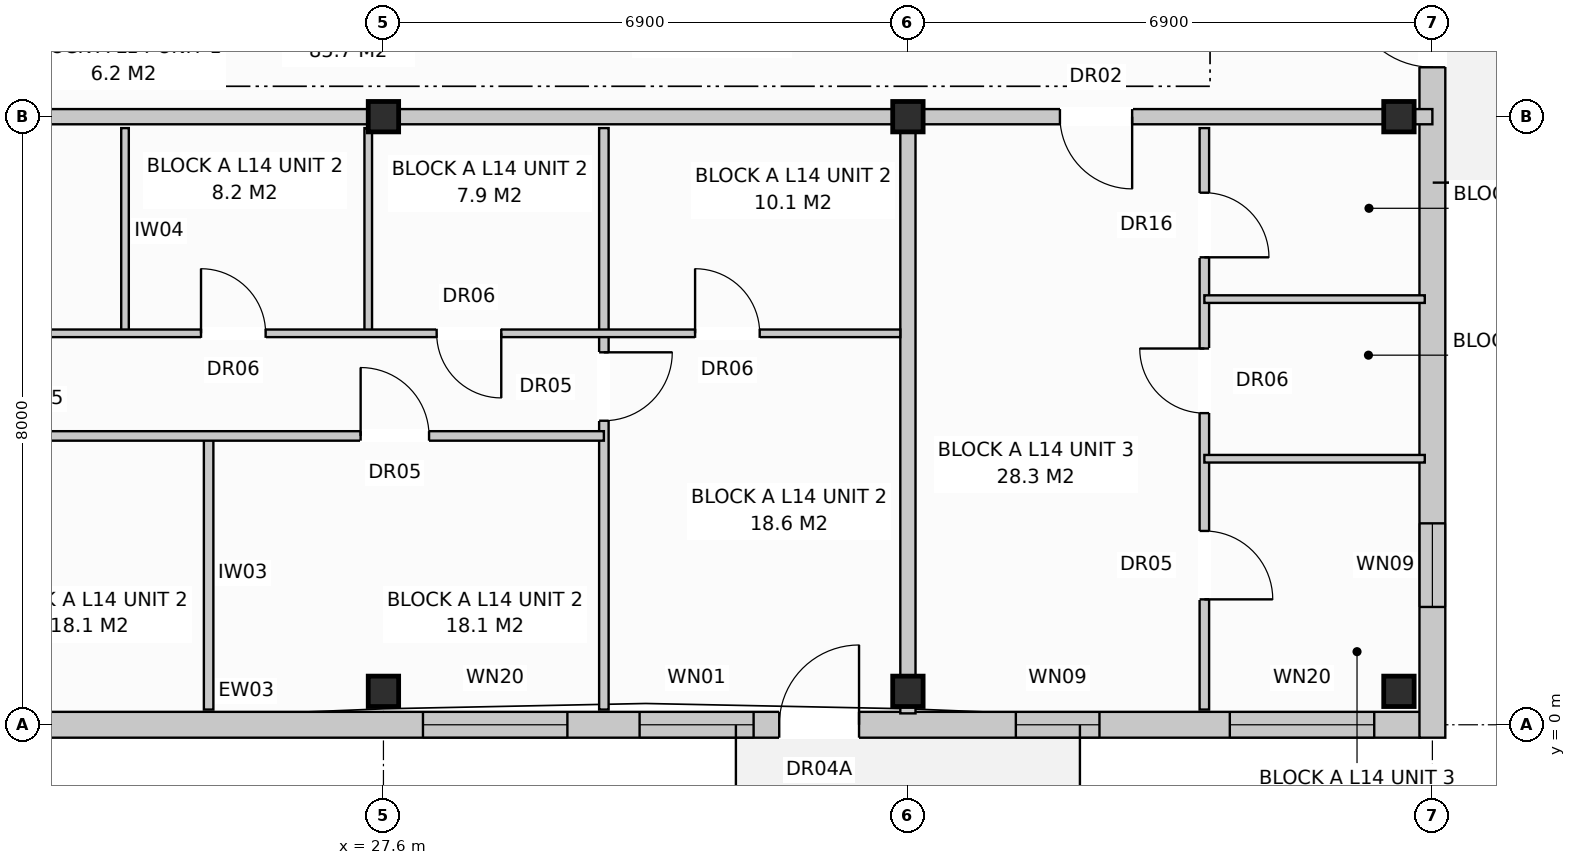
"""IFC4 building model, lengths in metres.
Left out: names, types, materials, properties, quantities, classifications, styles, units other than length and angle.
Written with IfcOpenShell. Run it as: python <this file> out.ifc"""

import sys

from ifc_helpers import new_model, si_unit, direction, frame, frame_2d, origin, origin_with_axes, origin_2d, place, context, subcontext, project, spatial, rectangle, extrude, element, fill, save


model = new_model("IFC4")
c1 = context("Model", 3, precision=1e-05, world=origin(), true_north=direction((0.0, 1.0)))
c2 = subcontext(c1, "Body", "Model", "MODEL_VIEW")
j1 = project(units=[si_unit("LENGTHUNIT", "METRE"), si_unit("PLANEANGLEUNIT", "RADIAN")], contexts=[c1])
p1 = place(None, origin())
s1 = spatial("IfcSite", under=j1, at=p1, CompositionType="ELEMENT")
p2 = place(p1, origin())
s2 = spatial("IfcBuilding", under=s1, at=p2, CompositionType="ELEMENT")
p3 = place(p2, frame((0.0, 0.0, 46.4)))
s3 = spatial("IfcBuildingStorey", under=s2, at=p3, CompositionType="ELEMENT", Elevation=46.4)
for number, where, z_axis, x_axis in (
    (1, (27.6, 0.44, 0.0), (0.0, 0.0, 1.0), (1.0, 0.0, 0.0)),
    (2, (27.6, 8.0, 0.0), (0.0, 0.0, 1.0), (1.0, 0.0, 0.0)),
    (3, (34.5, 0.44, 0.0), (0.0, 0.0, 1.0), (1.0, 0.0, 0.0)),
    (4, (34.5, 8.0, 0.0), (0.0, 0.0, 1.0), (1.0, 0.0, 0.0)),
    (5, (40.96, 0.44, 0.0), (0.0, 0.0, 1.0), (1.0, 0.0, 0.0)),
    (6, (40.96, 8.0, 0.0), (0.0, 0.0, 1.0), (1.0, 0.0, 0.0)),
):
    element("IfcColumn", number, at=place(p3, frame(where, z_axis=z_axis, x_axis=x_axis)), inside=s3, PredefinedType="COLUMN", context=c2, shape_type="SweptSolid", body=[
        extrude(rectangle(XDim=0.4, YDim=0.4, at=origin_2d()), origin(), (0.0, 0.0, 1.0), 3.2),
    ])
p4 = place(p3, frame((0.16, 0.0, 0.0), z_axis=(0.0, 0.0, 1.0), x_axis=(1.0, 0.0, 0.0)))
e7 = element("IfcWall", 7, at=p4, inside=s3, PredefinedType="STANDARD", context=c2, shape_type="SweptSolid", body=[
    extrude(rectangle(XDim=41.08, YDim=0.34, at=frame_2d((20.54, 0.0))), origin(), (0.0, 0.0, 1.0), 2.91),
])
p5 = place(p4, frame((7.36, 0.0, 0.0)))
e8 = element("IfcOpeningElement", 8, at=p5, cuts=e7, PredefinedType="OPENING", context=c2, shape_type="SweptSolid", body=[
    extrude(rectangle(XDim=1.05, YDim=2.12, at=frame_2d((0.525, 1.06))), frame((0.0, 0.182, 0.0), z_axis=(0.0, -1.0, 0.0), x_axis=(1.0, 0.0, 0.0)), (0.0, 0.0, 1.0), 0.364),
])
p6 = place(p4, frame((18.647, 0.0, 0.0)))
e9 = element("IfcOpeningElement", 9, at=p6, cuts=e7, PredefinedType="OPENING", context=c2, shape_type="SweptSolid", body=[
    extrude(rectangle(XDim=1.05, YDim=2.12, at=frame_2d((0.525, 1.06))), frame((0.0, 0.182, 0.0), z_axis=(0.0, -1.0, 0.0), x_axis=(1.0, 0.0, 0.0)), (0.0, 0.0, 1.0), 0.364),
])
p7 = place(p4, frame((32.647, 0.0, 0.0)))
e10 = element("IfcOpeningElement", 10, at=p7, cuts=e7, PredefinedType="OPENING", context=c2, shape_type="SweptSolid", body=[
    extrude(rectangle(XDim=1.05, YDim=2.12, at=frame_2d((0.525, 1.06))), frame((0.0, 0.182, 0.0), z_axis=(0.0, -1.0, 0.0), x_axis=(1.0, 0.0, 0.0)), (0.0, 0.0, 1.0), 0.364),
])
p8 = place(p4, frame((1.61, 0.0, 0.8)))
e11 = element("IfcOpeningElement", 11, at=p8, cuts=e7, PredefinedType="OPENING", context=c2, shape_type="SweptSolid", body=[
    extrude(rectangle(XDim=1.8, YDim=1.7, at=frame_2d((0.9, 0.85))), frame((0.0, 0.182, 0.0), z_axis=(0.0, -1.0, 0.0), x_axis=(1.0, 0.0, 0.0)), (0.0, 0.0, 1.0), 0.364),
])
p9 = place(p4, frame((10.46, 0.0, 0.8)))
e12 = element("IfcOpeningElement", 12, at=p9, cuts=e7, PredefinedType="OPENING", context=c2, shape_type="SweptSolid", body=[
    extrude(rectangle(XDim=1.9, YDim=1.85, at=frame_2d((0.95, 0.925))), frame((0.0, 0.182, 0.0), z_axis=(0.0, -1.0, 0.0), x_axis=(1.0, 0.0, 0.0)), (0.0, 0.0, 1.0), 0.364),
])
p10 = place(p4, frame((15.835, 0.0, 0.8)))
e13 = element("IfcOpeningElement", 13, at=p10, cuts=e7, PredefinedType="OPENING", context=c2, shape_type="SweptSolid", body=[
    extrude(rectangle(XDim=1.95, YDim=1.65, at=frame_2d((0.975, 0.825))), frame((0.0, 0.182, 0.0), z_axis=(0.0, -1.0, 0.0), x_axis=(1.0, 0.0, 0.0)), (0.0, 0.0, 1.0), 0.364),
])
p11 = place(p4, frame((21.96, 0.0, 0.72)))
e14 = element("IfcOpeningElement", 14, at=p11, cuts=e7, PredefinedType="OPENING", context=c2, shape_type="SweptSolid", body=[
    extrude(rectangle(XDim=1.1, YDim=1.5, at=frame_2d((0.55, 0.75))), frame((0.0, 0.182, 0.0), z_axis=(0.0, -1.0, 0.0), x_axis=(1.0, 0.0, 0.0)), (0.0, 0.0, 1.0), 0.364),
])
p12 = place(p4, frame((27.96, 0.0, 0.8)))
e15 = element("IfcOpeningElement", 15, at=p12, cuts=e7, PredefinedType="OPENING", context=c2, shape_type="SweptSolid", body=[
    extrude(rectangle(XDim=1.9, YDim=1.85, at=frame_2d((0.95, 0.925))), frame((0.0, 0.182, 0.0), z_axis=(0.0, -1.0, 0.0), x_axis=(1.0, 0.0, 0.0)), (0.0, 0.0, 1.0), 0.364),
])
p13 = place(p4, frame((30.81, 0.0, 0.85)))
e16 = element("IfcOpeningElement", 16, at=p13, cuts=e7, PredefinedType="OPENING", context=c2, shape_type="SweptSolid", body=[
    extrude(rectangle(XDim=1.5, YDim=1.65, at=frame_2d((0.75, 0.825))), frame((0.0, 0.182, 0.0), z_axis=(0.0, -1.0, 0.0), x_axis=(1.0, 0.0, 0.0)), (0.0, 0.0, 1.0), 0.364),
])
p14 = place(p4, frame((35.76, 0.0, 0.72)))
e17 = element("IfcOpeningElement", 17, at=p14, cuts=e7, PredefinedType="OPENING", context=c2, shape_type="SweptSolid", body=[
    extrude(rectangle(XDim=1.1, YDim=1.5, at=frame_2d((0.55, 0.75))), frame((0.0, 0.182, 0.0), z_axis=(0.0, -1.0, 0.0), x_axis=(1.0, 0.0, 0.0)), (0.0, 0.0, 1.0), 0.364),
])
p15 = place(p4, frame((38.575, 0.0, 0.8)))
e18 = element("IfcOpeningElement", 18, at=p15, cuts=e7, PredefinedType="OPENING", context=c2, shape_type="SweptSolid", body=[
    extrude(rectangle(XDim=1.9, YDim=1.85, at=frame_2d((0.95, 0.925))), frame((0.0, 0.182, 0.0), z_axis=(0.0, -1.0, 0.0), x_axis=(1.0, 0.0, 0.0)), (0.0, 0.0, 1.0), 0.364),
])
p16 = place(p3, frame((41.4, -0.17, 0.0), z_axis=(0.0, 0.0, 1.0), x_axis=(0.0, 1.0, 0.0)))
e19 = element("IfcWall", 19, at=p16, inside=s3, PredefinedType="STANDARD", context=c2, shape_type="SweptSolid", body=[
    extrude(rectangle(XDim=18.74, YDim=0.34, at=frame_2d((9.37, 0.0))), origin(), (0.0, 0.0, 1.0), 2.91),
])
p17 = place(p16, frame((8.82, 0.0, 0.0)))
e20 = element("IfcOpeningElement", 20, at=p17, cuts=e19, PredefinedType="OPENING", context=c2, shape_type="SweptSolid", body=[
    extrude(rectangle(XDim=1.1, YDim=2.1, at=frame_2d((0.55, 1.05))), frame((0.0, 0.182, 0.0), z_axis=(0.0, -1.0, 0.0), x_axis=(1.0, 0.0, 0.0)), (0.0, 0.0, 1.0), 0.364),
])
p18 = place(p16, frame((1.72, 0.0, 0.72)))
e21 = element("IfcOpeningElement", 21, at=p18, cuts=e19, PredefinedType="OPENING", context=c2, shape_type="SweptSolid", body=[
    extrude(rectangle(XDim=1.1, YDim=1.5, at=frame_2d((0.55, 0.75))), frame((0.0, 0.182, 0.0), z_axis=(0.0, -1.0, 0.0), x_axis=(1.0, 0.0, 0.0)), (0.0, 0.0, 1.0), 0.364),
])
p19 = place(p16, frame((15.92, 0.0, 0.72)))
e22 = element("IfcOpeningElement", 22, at=p19, cuts=e19, PredefinedType="OPENING", context=c2, shape_type="SweptSolid", body=[
    extrude(rectangle(XDim=1.1, YDim=1.5, at=frame_2d((0.55, 0.75))), frame((0.0, 0.182, 0.0), z_axis=(0.0, -1.0, 0.0), x_axis=(1.0, 0.0, 0.0)), (0.0, 0.0, 1.0), 0.364),
])
p20 = place(p3, frame((34.5, 7.85, 0.0), z_axis=(0.0, 0.0, 1.0), x_axis=(0.0, -1.0, 0.0)))
e23 = element("IfcWall", 23, at=p20, inside=s3, PredefinedType="PARTITIONING", context=c2, shape_type="SweptSolid", body=[
    extrude(rectangle(XDim=7.7, YDim=0.2, at=frame_2d((3.85, 0.0))), origin(), (0.0, 0.0, 1.0), 2.35),
])
p21 = place(p3, frame((13.8, 8.0, 0.0), z_axis=(0.0, 0.0, 1.0), x_axis=(1.0, 0.0, 0.0)))
e24 = element("IfcWall", 24, at=p21, inside=s3, PredefinedType="PARTITIONING", context=c2, shape_type="SweptSolid", body=[
    extrude(rectangle(XDim=20.7, YDim=0.2, at=frame_2d((10.35, 0.0))), origin(), (0.0, 0.0, 1.0), 2.35),
])
p22 = place(p21, frame((2.4, 0.0, 0.0)))
e25 = element("IfcOpeningElement", 25, at=p22, cuts=e24, PredefinedType="OPENING", context=c2, shape_type="SweptSolid", body=[
    extrude(rectangle(XDim=0.95, YDim=2.15, at=frame_2d((0.475, 1.075))), frame((0.0, 0.112, 0.0), z_axis=(0.0, -1.0, 0.0), x_axis=(1.0, 0.0, 0.0)), (0.0, 0.0, 1.0), 0.224),
])
for number, where, z_axis, x_axis in (
    (26, (24.2, 7.85, 0.0), (0.0, 0.0, 1.0), (0.0, -1.0, 0.0)),
    (27, (27.4, 7.85, 0.0), (0.0, 0.0, 1.0), (0.0, -1.0, 0.0)),
):
    element("IfcWall", number, at=place(p3, frame(where, z_axis=z_axis, x_axis=x_axis)), inside=s3, PredefinedType="PARTITIONING", context=c2, shape_type="SweptSolid", body=[
        extrude(rectangle(XDim=2.7, YDim=0.1, at=frame_2d((1.35, 0.0))), origin(), (0.0, 0.0, 1.0), 2.91),
    ])
p23 = place(p3, frame((25.3, 3.8, 0.0), z_axis=(0.0, 0.0, 1.0), x_axis=(0.0, -1.0, 0.0)))
e28 = element("IfcWall", 28, at=p23, inside=s3, PredefinedType="PARTITIONING", context=c2, shape_type="SweptSolid", body=[
    extrude(rectangle(XDim=3.6, YDim=0.125, at=frame_2d((1.8, 0.0))), origin(), (0.0, 0.0, 1.0), 2.91),
])
p24 = place(p3, frame((30.5, 7.85, 0.0), z_axis=(0.0, 0.0, 1.0), x_axis=(0.0, -1.0, 0.0)))
e29 = element("IfcWall", 29, at=p24, inside=s3, PredefinedType="PARTITIONING", context=c2, shape_type="SweptSolid", body=[
    extrude(rectangle(XDim=7.65, YDim=0.125, at=frame_2d((3.825, 0.0))), origin(), (0.0, 0.0, 1.0), 2.91),
])
p25 = place(p24, frame((2.95, 0.0, 0.0)))
e30 = element("IfcOpeningElement", 30, at=p25, cuts=e29, PredefinedType="OPENING", context=c2, shape_type="SweptSolid", body=[
    extrude(rectangle(XDim=0.9, YDim=2.1, at=frame_2d((0.45, 1.05))), frame((0.0, 0.074, 0.0), z_axis=(0.0, -1.0, 0.0), x_axis=(1.0, 0.0, 0.0)), (0.0, 0.0, 1.0), 0.149),
])
p26 = place(p3, frame((20.1, 5.15, 0.0), z_axis=(0.0, 0.0, 1.0), x_axis=(1.0, 0.0, 0.0)))
e31 = element("IfcWall", 31, at=p26, inside=s3, PredefinedType="PARTITIONING", context=c2, shape_type="SweptSolid", body=[
    extrude(rectangle(XDim=14.3, YDim=0.1, at=frame_2d((7.15, 0.0))), origin(), (0.0, 0.0, 1.0), 2.91),
])
p27 = place(p26, frame((1.6, 0.0, 0.0)))
e32 = element("IfcOpeningElement", 32, at=p27, cuts=e31, PredefinedType="OPENING", context=c2, shape_type="SweptSolid", body=[
    extrude(rectangle(XDim=0.9, YDim=2.1, at=frame_2d((0.45, 1.05))), frame((0.0, 0.062, 0.0), z_axis=(0.0, -1.0, 0.0), x_axis=(1.0, 0.0, 0.0)), (0.0, 0.0, 1.0), 0.124),
])
p28 = place(p26, frame((5.1, 0.0, 0.0)))
e33 = element("IfcOpeningElement", 33, at=p28, cuts=e31, PredefinedType="OPENING", context=c2, shape_type="SweptSolid", body=[
    extrude(rectangle(XDim=0.85, YDim=2.05, at=frame_2d((0.425, 1.025))), frame((0.0, 0.062, 0.0), z_axis=(0.0, -1.0, 0.0), x_axis=(1.0, 0.0, 0.0)), (0.0, 0.0, 1.0), 0.124),
])
p29 = place(p26, frame((8.2, 0.0, 0.0)))
e34 = element("IfcOpeningElement", 34, at=p29, cuts=e31, PredefinedType="OPENING", context=c2, shape_type="SweptSolid", body=[
    extrude(rectangle(XDim=0.85, YDim=2.05, at=frame_2d((0.425, 1.025))), frame((0.0, 0.062, 0.0), z_axis=(0.0, -1.0, 0.0), x_axis=(1.0, 0.0, 0.0)), (0.0, 0.0, 1.0), 0.124),
])
p30 = place(p26, frame((11.6, 0.0, 0.0)))
e35 = element("IfcOpeningElement", 35, at=p30, cuts=e31, PredefinedType="OPENING", context=c2, shape_type="SweptSolid", body=[
    extrude(rectangle(XDim=0.85, YDim=2.05, at=frame_2d((0.425, 1.025))), frame((0.0, 0.062, 0.0), z_axis=(0.0, -1.0, 0.0), x_axis=(1.0, 0.0, 0.0)), (0.0, 0.0, 1.0), 0.124),
])
p31 = place(p3, frame((20.1, 3.8, 0.0), z_axis=(0.0, 0.0, 1.0), x_axis=(1.0, 0.0, 0.0)))
e36 = element("IfcWall", 36, at=p31, inside=s3, PredefinedType="PARTITIONING", context=c2, shape_type="SweptSolid", body=[
    extrude(rectangle(XDim=10.4, YDim=0.125, at=frame_2d((5.2, 0.0))), origin(), (0.0, 0.0, 1.0), 2.91),
])
p32 = place(p31, frame((2.0, 0.0, 0.0)))
e37 = element("IfcOpeningElement", 37, at=p32, cuts=e36, PredefinedType="OPENING", context=c2, shape_type="SweptSolid", body=[
    extrude(rectangle(XDim=0.9, YDim=2.1, at=frame_2d((0.45, 1.05))), frame((0.0, 0.074, 0.0), z_axis=(0.0, -1.0, 0.0), x_axis=(1.0, 0.0, 0.0)), (0.0, 0.0, 1.0), 0.149),
])
p33 = place(p31, frame((7.2, 0.0, 0.0)))
e38 = element("IfcOpeningElement", 38, at=p33, cuts=e36, PredefinedType="OPENING", context=c2, shape_type="SweptSolid", body=[
    extrude(rectangle(XDim=0.9, YDim=2.1, at=frame_2d((0.45, 1.05))), frame((0.0, 0.074, 0.0), z_axis=(0.0, -1.0, 0.0), x_axis=(1.0, 0.0, 0.0)), (0.0, 0.0, 1.0), 0.149),
])
p34 = place(p3, frame((34.5, 8.0, 0.0), z_axis=(0.0, 0.0, 1.0), x_axis=(1.0, 0.0, 0.0)))
e39 = element("IfcWall", 39, at=p34, inside=s3, PredefinedType="PARTITIONING", context=c2, shape_type="SweptSolid", body=[
    extrude(rectangle(XDim=6.9, YDim=0.2, at=frame_2d((3.45, 0.0))), origin(), (0.0, 0.0, 1.0), 2.35),
])
p35 = place(p34, frame((2.0, 0.0, 0.0)))
e40 = element("IfcOpeningElement", 40, at=p35, cuts=e39, PredefinedType="OPENING", context=c2, shape_type="SweptSolid", body=[
    extrude(rectangle(XDim=0.95, YDim=2.15, at=frame_2d((0.475, 1.075))), frame((0.0, 0.112, 0.0), z_axis=(0.0, -1.0, 0.0), x_axis=(1.0, 0.0, 0.0)), (0.0, 0.0, 1.0), 0.224),
])
p36 = place(p3, frame((38.4, 7.85, 0.0), z_axis=(0.0, 0.0, 1.0), x_axis=(0.0, -1.0, 0.0)))
e41 = element("IfcWall", 41, at=p36, inside=s3, PredefinedType="PARTITIONING", context=c2, shape_type="SweptSolid", body=[
    extrude(rectangle(XDim=7.65, YDim=0.125, at=frame_2d((3.825, 0.0))), origin(), (0.0, 0.0, 1.0), 2.91),
])
p37 = place(p36, frame((0.85, 0.0, 0.0)))
e42 = element("IfcOpeningElement", 42, at=p37, cuts=e41, PredefinedType="OPENING", context=c2, shape_type="SweptSolid", body=[
    extrude(rectangle(XDim=0.85, YDim=2.1, at=frame_2d((0.425, 1.05))), frame((0.0, 0.074, 0.0), z_axis=(0.0, -1.0, 0.0), x_axis=(1.0, 0.0, 0.0)), (0.0, 0.0, 1.0), 0.149),
])
p38 = place(p36, frame((2.9, 0.0, 0.0)))
e43 = element("IfcOpeningElement", 43, at=p38, cuts=e41, PredefinedType="OPENING", context=c2, shape_type="SweptSolid", body=[
    extrude(rectangle(XDim=0.85, YDim=2.05, at=frame_2d((0.425, 1.025))), frame((0.0, 0.074, 0.0), z_axis=(0.0, -1.0, 0.0), x_axis=(1.0, 0.0, 0.0)), (0.0, 0.0, 1.0), 0.149),
])
p39 = place(p36, frame((5.3, 0.0, 0.0)))
e44 = element("IfcOpeningElement", 44, at=p39, cuts=e41, PredefinedType="OPENING", context=c2, shape_type="SweptSolid", body=[
    extrude(rectangle(XDim=0.9, YDim=2.1, at=frame_2d((0.45, 1.05))), frame((0.0, 0.074, 0.0), z_axis=(0.0, -1.0, 0.0), x_axis=(1.0, 0.0, 0.0)), (0.0, 0.0, 1.0), 0.149),
])
for number, where, z_axis, x_axis in (
    (45, (38.4, 5.6, 0.0), (0.0, 0.0, 1.0), (1.0, 0.0, 0.0)),
    (46, (38.4, 3.5, 0.0), (0.0, 0.0, 1.0), (1.0, 0.0, 0.0)),
):
    element("IfcWall", number, at=place(p3, frame(where, z_axis=z_axis, x_axis=x_axis)), inside=s3, PredefinedType="PARTITIONING", context=c2, shape_type="SweptSolid", body=[
        extrude(rectangle(XDim=2.9, YDim=0.1, at=frame_2d((1.45, 0.0))), origin(), (0.0, 0.0, 1.0), 2.91),
    ])
p40 = place(p7, origin_with_axes())
e47 = element("IfcDoor", 47, at=p40, inside=s3, OperationType="SINGLE_SWING_RIGHT", PredefinedType="DOOR", context=c2, shape_type="SweptSolid", body=[
    extrude(rectangle(XDim=1.05, YDim=2.12, at=frame_2d((0.525, 1.06))), frame((0.0, 0.025, 0.0), z_axis=(0.0, -1.0, 0.0), x_axis=(1.0, 0.0, 0.0)), (0.0, 0.0, 1.0), 0.05),
])
fill(e10, e47)
p41 = place(p12, origin_with_axes())
e48 = element("IfcWindow", 48, at=p41, inside=s3, PartitioningType="SINGLE_PANEL", PredefinedType="WINDOW", context=c2, shape_type="SweptSolid", body=[
    extrude(rectangle(XDim=1.9, YDim=1.85, at=frame_2d((0.95, 0.925))), frame((0.0, 0.03, 0.0), z_axis=(0.0, -1.0, 0.0), x_axis=(1.0, 0.0, 0.0)), (0.0, 0.0, 1.0), 0.06),
])
fill(e15, e48)
p42 = place(p13, origin_with_axes())
e49 = element("IfcWindow", 49, at=p42, inside=s3, PartitioningType="SINGLE_PANEL", PredefinedType="WINDOW", context=c2, shape_type="SweptSolid", body=[
    extrude(rectangle(XDim=1.5, YDim=1.65, at=frame_2d((0.75, 0.825))), frame((0.0, 0.03, 0.0), z_axis=(0.0, -1.0, 0.0), x_axis=(1.0, 0.0, 0.0)), (0.0, 0.0, 1.0), 0.06),
])
fill(e16, e49)
p43 = place(p14, origin_with_axes())
e50 = element("IfcWindow", 50, at=p43, inside=s3, PartitioningType="SINGLE_PANEL", PredefinedType="WINDOW", context=c2, shape_type="SweptSolid", body=[
    extrude(rectangle(XDim=1.1, YDim=1.5, at=frame_2d((0.55, 0.75))), frame((0.0, 0.03, 0.0), z_axis=(0.0, -1.0, 0.0), x_axis=(1.0, 0.0, 0.0)), (0.0, 0.0, 1.0), 0.06),
])
fill(e17, e50)
p44 = place(p15, origin_with_axes())
e51 = element("IfcWindow", 51, at=p44, inside=s3, PartitioningType="SINGLE_PANEL", PredefinedType="WINDOW", context=c2, shape_type="SweptSolid", body=[
    extrude(rectangle(XDim=1.9, YDim=1.85, at=frame_2d((0.95, 0.925))), frame((0.0, 0.03, 0.0), z_axis=(0.0, -1.0, 0.0), x_axis=(1.0, 0.0, 0.0)), (0.0, 0.0, 1.0), 0.06),
])
fill(e18, e51)
p45 = place(p17, origin_with_axes())
e52 = element("IfcDoor", 52, at=p45, inside=s3, OperationType="SINGLE_SWING_RIGHT", PredefinedType="DOOR", context=c2, shape_type="SweptSolid", body=[
    extrude(rectangle(XDim=1.1, YDim=2.1, at=frame_2d((0.55, 1.05))), frame((0.0, 0.025, 0.0), z_axis=(0.0, -1.0, 0.0), x_axis=(1.0, 0.0, 0.0)), (0.0, 0.0, 1.0), 0.05),
])
fill(e20, e52)
p46 = place(p18, origin_with_axes())
e53 = element("IfcWindow", 53, at=p46, inside=s3, PartitioningType="SINGLE_PANEL", PredefinedType="WINDOW", context=c2, shape_type="SweptSolid", body=[
    extrude(rectangle(XDim=1.1, YDim=1.5, at=frame_2d((0.55, 0.75))), frame((0.0, 0.03, 0.0), z_axis=(0.0, -1.0, 0.0), x_axis=(1.0, 0.0, 0.0)), (0.0, 0.0, 1.0), 0.06),
])
fill(e21, e53)
p47 = place(p25, origin_with_axes())
e54 = element("IfcDoor", 54, at=p47, inside=s3, OperationType="SINGLE_SWING_LEFT", PredefinedType="DOOR", context=c2, shape_type="SweptSolid", body=[
    extrude(rectangle(XDim=0.9, YDim=2.1, at=frame_2d((0.45, 1.05))), frame((0.0, 0.025, 0.0), z_axis=(0.0, -1.0, 0.0), x_axis=(1.0, 0.0, 0.0)), (0.0, 0.0, 1.0), 0.05),
])
fill(e30, e54)
p48 = place(p28, origin_with_axes())
e55 = element("IfcDoor", 55, at=p48, inside=s3, OperationType="SINGLE_SWING_LEFT", PredefinedType="DOOR", context=c2, shape_type="SweptSolid", body=[
    extrude(rectangle(XDim=0.85, YDim=2.05, at=frame_2d((0.425, 1.025))), frame((0.0, 0.025, 0.0), z_axis=(0.0, -1.0, 0.0), x_axis=(1.0, 0.0, 0.0)), (0.0, 0.0, 1.0), 0.05),
])
fill(e33, e55)
p49 = place(p29, frame((0.85, 0.0, 0.0), z_axis=(0.0, 0.0, 1.0), x_axis=(-1.0, 0.0, 0.0)))
e56 = element("IfcDoor", 56, at=p49, inside=s3, OperationType="SINGLE_SWING_RIGHT", PredefinedType="DOOR", context=c2, shape_type="SweptSolid", body=[
    extrude(rectangle(XDim=0.85, YDim=2.05, at=frame_2d((0.425, 1.025))), frame((0.0, 0.025, 0.0), z_axis=(0.0, -1.0, 0.0), x_axis=(1.0, 0.0, 0.0)), (0.0, 0.0, 1.0), 0.05),
])
fill(e34, e56)
p50 = place(p30, origin_with_axes())
e57 = element("IfcDoor", 57, at=p50, inside=s3, OperationType="SINGLE_SWING_LEFT", PredefinedType="DOOR", context=c2, shape_type="SweptSolid", body=[
    extrude(rectangle(XDim=0.85, YDim=2.05, at=frame_2d((0.425, 1.025))), frame((0.0, 0.025, 0.0), z_axis=(0.0, -1.0, 0.0), x_axis=(1.0, 0.0, 0.0)), (0.0, 0.0, 1.0), 0.05),
])
fill(e35, e57)
p51 = place(p33, origin_with_axes())
e58 = element("IfcDoor", 58, at=p51, inside=s3, OperationType="SINGLE_SWING_LEFT", PredefinedType="DOOR", context=c2, shape_type="SweptSolid", body=[
    extrude(rectangle(XDim=0.9, YDim=2.1, at=frame_2d((0.45, 1.05))), frame((0.0, 0.025, 0.0), z_axis=(0.0, -1.0, 0.0), x_axis=(1.0, 0.0, 0.0)), (0.0, 0.0, 1.0), 0.05),
])
fill(e38, e58)
p52 = place(p35, frame((0.95, 0.0, 0.0), z_axis=(0.0, 0.0, 1.0), x_axis=(-1.0, 0.0, 0.0)))
e59 = element("IfcDoor", 59, at=p52, inside=s3, OperationType="SINGLE_SWING_RIGHT", PredefinedType="DOOR", context=c2, shape_type="SweptSolid", body=[
    extrude(rectangle(XDim=0.95, YDim=2.15, at=frame_2d((0.475, 1.075))), frame((0.0, 0.025, 0.0), z_axis=(0.0, -1.0, 0.0), x_axis=(1.0, 0.0, 0.0)), (0.0, 0.0, 1.0), 0.05),
])
fill(e40, e59)
p53 = place(p37, origin_with_axes())
e60 = element("IfcDoor", 60, at=p53, inside=s3, OperationType="SINGLE_SWING_RIGHT", PredefinedType="DOOR", context=c2, shape_type="SweptSolid", body=[
    extrude(rectangle(XDim=0.85, YDim=2.1, at=frame_2d((0.425, 1.05))), frame((0.0, 0.025, 0.0), z_axis=(0.0, -1.0, 0.0), x_axis=(1.0, 0.0, 0.0)), (0.0, 0.0, 1.0), 0.05),
])
fill(e42, e60)
p54 = place(p38, frame((0.85, 0.0, 0.0), z_axis=(0.0, 0.0, 1.0), x_axis=(-1.0, 0.0, 0.0)))
e61 = element("IfcDoor", 61, at=p54, inside=s3, OperationType="SINGLE_SWING_LEFT", PredefinedType="DOOR", context=c2, shape_type="SweptSolid", body=[
    extrude(rectangle(XDim=0.85, YDim=2.05, at=frame_2d((0.425, 1.025))), frame((0.0, 0.025, 0.0), z_axis=(0.0, -1.0, 0.0), x_axis=(1.0, 0.0, 0.0)), (0.0, 0.0, 1.0), 0.05),
])
fill(e43, e61)
p55 = place(p39, origin_with_axes())
e62 = element("IfcDoor", 62, at=p55, inside=s3, OperationType="SINGLE_SWING_RIGHT", PredefinedType="DOOR", context=c2, shape_type="SweptSolid", body=[
    extrude(rectangle(XDim=0.9, YDim=2.1, at=frame_2d((0.45, 1.05))), frame((0.0, 0.025, 0.0), z_axis=(0.0, -1.0, 0.0), x_axis=(1.0, 0.0, 0.0)), (0.0, 0.0, 1.0), 0.05),
])
fill(e44, e62)
save(model, sys.argv[1])
